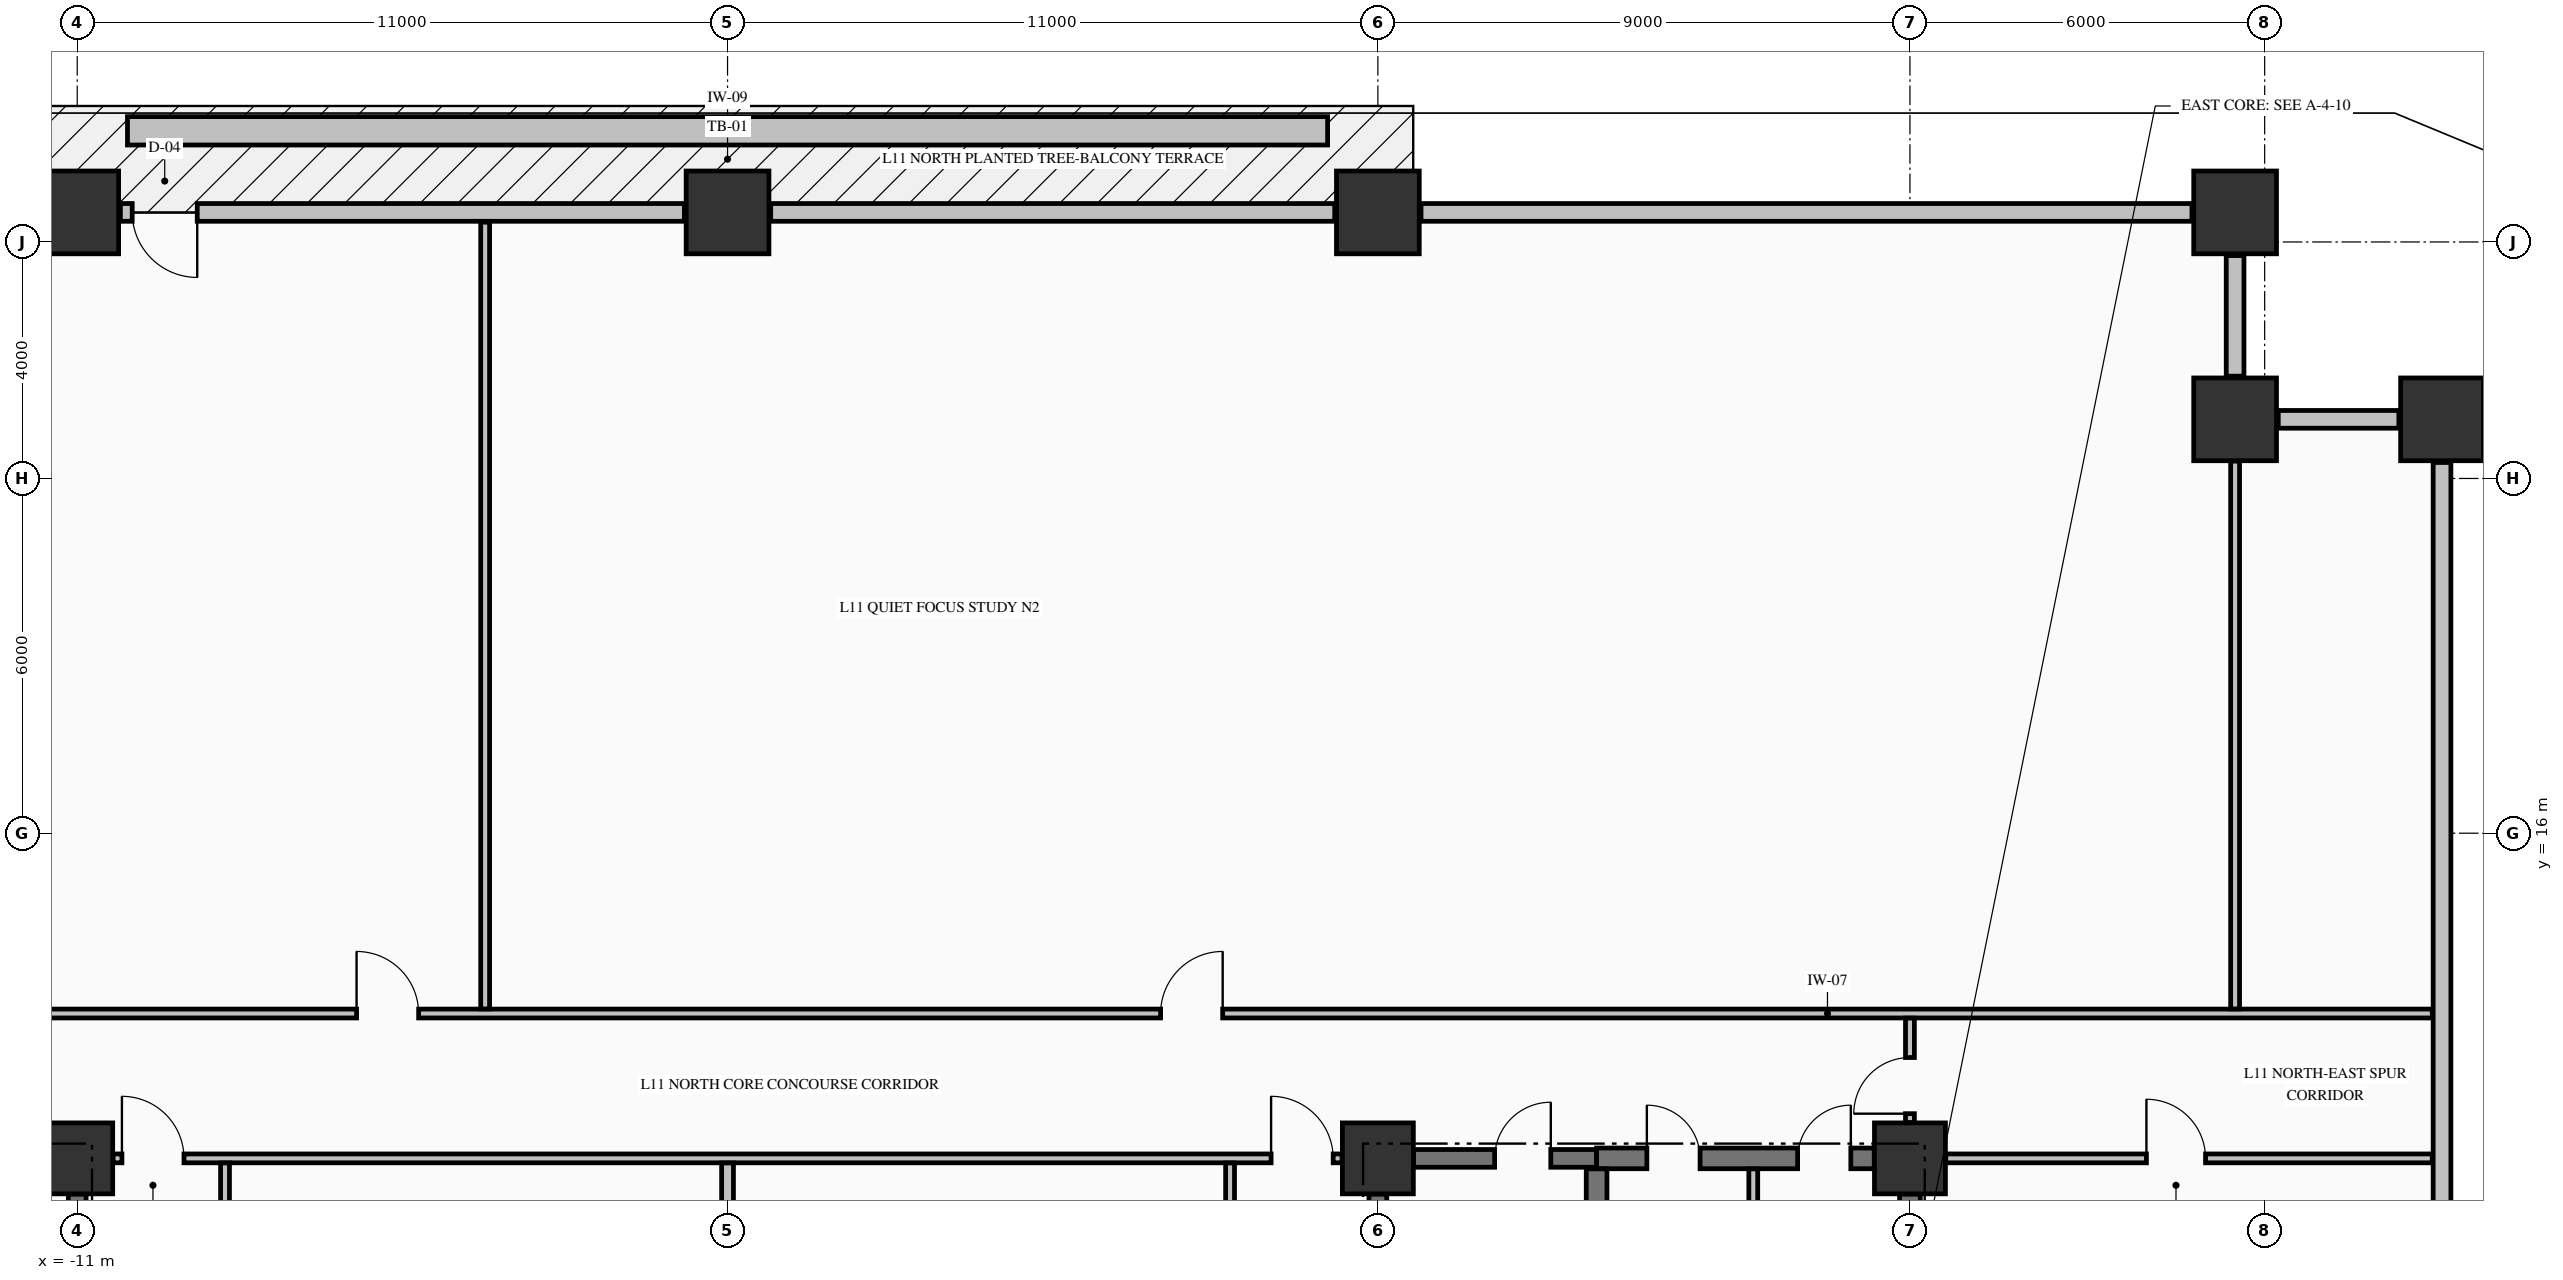
"""IFC4 building model, lengths in metres.
Left out: names, types, materials, properties, quantities, classifications, styles, units other than length and angle.
Written with IfcOpenShell. Run it as: python <this file> out.ifc"""

import sys

from ifc_helpers import new_model, si_unit, direction, frame, frame_2d, origin, origin_2d, place, context, subcontext, project, spatial, rectangle, extrude, element, fill, save


model = new_model("IFC4")
c1 = context("Model", 3, precision=1e-05, world=origin(), true_north=direction((0.0, 1.0)))
c2 = subcontext(c1, "Body", "Model", "MODEL_VIEW")
j1 = project(units=[si_unit("LENGTHUNIT", "METRE"), si_unit("PLANEANGLEUNIT", "RADIAN")], contexts=[c1])
p1 = place(None, origin())
s1 = spatial("IfcSite", under=j1, at=p1, CompositionType="ELEMENT")
p2 = place(p1, origin())
s2 = spatial("IfcBuilding", under=s1, at=p2, CompositionType="ELEMENT")
p3 = place(p2, frame((0.0, 0.0, 48.62)))
s3 = spatial("IfcBuildingStorey", under=s2, at=p3, CompositionType="ELEMENT", Elevation=48.62)
for number, where, z_axis, x_axis in (
    (1, (-11.0, 26.5, -0.25), (0.0, 0.0, 1.0), (1.0, 0.0, 0.0)),
    (2, (0.0, 26.5, -0.25), (0.0, 0.0, 1.0), (1.0, 0.0, 0.0)),
    (3, (11.0, 26.5, -0.25), (0.0, 0.0, 1.0), (1.0, 0.0, 0.0)),
    (4, (25.5, 26.5, -0.25), (0.0, 0.0, 1.0), (1.0, 0.0, 0.0)),
    (5, (29.0, 23.0, -0.25), (0.0, 0.0, 1.0), (1.0, 0.0, 0.0)),
    (6, (25.5, 23.0, -0.25), (0.0, 0.0, 1.0), (1.0, 0.0, 0.0)),
):
    element("IfcColumn", number, at=place(p3, frame(where, z_axis=z_axis, x_axis=x_axis)), inside=s3, PredefinedType="COLUMN", context=c2, shape_type="SweptSolid", body=[
        extrude(rectangle(XDim=1.4, YDim=1.4, at=origin_2d()), origin(), (0.0, 0.0, 1.0), 3.395),
    ])
for number, where, z_axis, x_axis in (
    (7, (-11.0, 10.5, -0.25), (0.0, 0.0, 1.0), (1.0, 0.0, 0.0)),
    (8, (11.0, 10.5, -0.25), (0.0, 0.0, 1.0), (1.0, 0.0, 0.0)),
    (9, (20.0, 10.5, -0.25), (0.0, 0.0, 1.0), (1.0, 0.0, 0.0)),
):
    element("IfcColumn", number, at=place(p3, frame(where, z_axis=z_axis, x_axis=x_axis)), inside=s3, PredefinedType="COLUMN", context=c2, shape_type="SweptSolid", body=[
        extrude(rectangle(XDim=1.2, YDim=1.2, at=origin_2d()), origin(), (0.0, 0.0, 1.0), 3.395),
    ])
for number, where, z_axis, x_axis in (
    (10, (28.27, 23.0, 0.0), (0.0, 0.0, 1.0), (-1.0, 0.0, 0.0)),
    (11, (25.5, 23.73, 0.0), (0.0, 0.0, 1.0), (0.0, 1.0, 0.0)),
):
    element("IfcWall", number, at=place(p3, frame(where, z_axis=z_axis, x_axis=x_axis)), inside=s3, PredefinedType="STANDARD", context=c2, shape_type="SweptSolid", body=[
        extrude(rectangle(XDim=2.04, YDim=0.3, at=frame_2d((1.02, 0.0))), origin(), (0.0, 0.0, 1.0), 2.537),
    ])
p4 = place(p3, frame((-0.73, 26.5, 0.0), z_axis=(0.0, 0.0, 1.0), x_axis=(-1.0, 0.0, 0.0)))
e12 = element("IfcWall", 12, at=p4, inside=s3, PredefinedType="STANDARD", context=c2, shape_type="SweptSolid", body=[
    extrude(rectangle(XDim=9.54, YDim=0.3, at=frame_2d((4.77, 0.0))), origin(), (0.0, 0.0, 1.0), 2.537),
])
p5 = place(p4, frame((8.24, 0.0, 0.0)))
e13 = element("IfcOpeningElement", 13, at=p5, cuts=e12, PredefinedType="OPENING", context=c2, shape_type="SweptSolid", body=[
    extrude(rectangle(XDim=1.1, YDim=2.15, at=frame_2d((0.55, 1.075))), frame((0.0, 0.16, 0.0), z_axis=(0.0, -1.0, 0.0), x_axis=(1.0, 0.0, 0.0)), (0.0, 0.0, 1.0), 0.32),
])
p6 = place(p3, frame((10.27, 26.5, 0.0), z_axis=(0.0, 0.0, 1.0), x_axis=(-1.0, 0.0, 0.0)))
e14 = element("IfcWall", 14, at=p6, inside=s3, PredefinedType="STANDARD", context=c2, shape_type="SweptSolid", body=[
    extrude(rectangle(XDim=9.54, YDim=0.3, at=frame_2d((4.77, 0.0))), origin(), (0.0, 0.0, 1.0), 2.537),
])
p7 = place(p3, frame((24.77, 26.5, 0.0), z_axis=(0.0, 0.0, 1.0), x_axis=(-1.0, 0.0, 0.0)))
e15 = element("IfcWall", 15, at=p7, inside=s3, PredefinedType="STANDARD", context=c2, shape_type="SweptSolid", body=[
    extrude(rectangle(XDim=13.04, YDim=0.3, at=frame_2d((6.52, 0.0))), origin(), (0.0, 0.0, 1.0), 2.537),
])
p8 = place(p3, frame((29.0, 9.73, 0.0), z_axis=(0.0, 0.0, 1.0), x_axis=(0.0, 1.0, 0.0)))
e16 = element("IfcWall", 16, at=p8, inside=s3, PredefinedType="STANDARD", context=c2, shape_type="SweptSolid", body=[
    extrude(rectangle(XDim=12.54, YDim=0.3, at=frame_2d((6.27, 0.0))), origin(), (0.0, 0.0, 1.0), 2.537),
])
p9 = place(p3, frame((11.604, 10.5, 0.0), z_axis=(0.0, 0.0, 1.0), x_axis=(1.0, 0.0, 0.0)))
e17 = element("IfcWall", 17, at=p9, inside=s3, PredefinedType="SHEAR", context=c2, shape_type="SweptSolid", body=[
    extrude(rectangle(XDim=3.096, YDim=0.3, at=frame_2d((1.548, 0.0))), origin(), (0.0, 0.0, 1.0), 3.145),
])
p10 = place(p9, frame((1.371, 0.0, 0.0)))
e18 = element("IfcOpeningElement", 18, at=p10, cuts=e17, PredefinedType="OPENING", context=c2, shape_type="SweptSolid", body=[
    extrude(rectangle(XDim=0.95, YDim=2.15, at=frame_2d((0.475, 1.075))), frame((0.0, 0.16, 0.0), z_axis=(0.0, -1.0, 0.0), x_axis=(1.0, 0.0, 0.0)), (0.0, 0.0, 1.0), 0.32),
])
p11 = place(p3, frame((14.7, 10.5, 0.0), z_axis=(0.0, 0.0, 1.0), x_axis=(1.0, 0.0, 0.0)))
e19 = element("IfcWall", 19, at=p11, inside=s3, PredefinedType="SHEAR", context=c2, shape_type="SweptSolid", body=[
    extrude(rectangle(XDim=4.696, YDim=0.35, at=frame_2d((2.348, 0.0))), origin(), (0.0, 0.0, 1.0), 3.145),
])
p12 = place(p11, frame((0.85, 0.0, 0.0)))
e20 = element("IfcOpeningElement", 20, at=p12, cuts=e19, PredefinedType="OPENING", context=c2, shape_type="SweptSolid", body=[
    extrude(rectangle(XDim=0.9, YDim=2.15, at=frame_2d((0.45, 1.075))), frame((0.0, 0.185, 0.0), z_axis=(0.0, -1.0, 0.0), x_axis=(1.0, 0.0, 0.0)), (0.0, 0.0, 1.0), 0.37),
])
p13 = place(p11, frame((3.4, 0.0, 0.0)))
e21 = element("IfcOpeningElement", 21, at=p13, cuts=e19, PredefinedType="OPENING", context=c2, shape_type="SweptSolid", body=[
    extrude(rectangle(XDim=0.9, YDim=2.15, at=frame_2d((0.45, 1.075))), frame((0.0, 0.185, 0.0), z_axis=(0.0, -1.0, 0.0), x_axis=(1.0, 0.0, 0.0)), (0.0, 0.0, 1.0), 0.37),
])
p14 = place(p3, frame((-10.394, 10.5, 0.0), z_axis=(0.0, 0.0, 1.0), x_axis=(1.0, 0.0, 0.0)))
e22 = element("IfcWall", 22, at=p14, inside=s3, PredefinedType="PARTITIONING", context=c2, shape_type="SweptSolid", body=[
    extrude(rectangle(XDim=20.788, YDim=0.15, at=frame_2d((10.394, 0.0))), origin(), (0.0, 0.0, 1.0), 3.145),
])
p15 = place(p14, frame((0.15, 0.0, 0.0)))
e23 = element("IfcOpeningElement", 23, at=p15, cuts=e22, PredefinedType="OPENING", context=c2, shape_type="SweptSolid", body=[
    extrude(rectangle(XDim=1.05, YDim=2.15, at=frame_2d((0.525, 1.075))), frame((0.0, 0.085, 0.0), z_axis=(0.0, -1.0, 0.0), x_axis=(1.0, 0.0, 0.0)), (0.0, 0.0, 1.0), 0.17),
])
p16 = place(p14, frame((19.588, 0.0, 0.0)))
e24 = element("IfcOpeningElement", 24, at=p16, cuts=e22, PredefinedType="OPENING", context=c2, shape_type="SweptSolid", body=[
    extrude(rectangle(XDim=1.05, YDim=2.15, at=frame_2d((0.525, 1.075))), frame((0.0, 0.085, 0.0), z_axis=(0.0, -1.0, 0.0), x_axis=(1.0, 0.0, 0.0)), (0.0, 0.0, 1.0), 0.17),
])
p17 = place(p3, frame((20.606, 10.5, 0.0), z_axis=(0.0, 0.0, 1.0), x_axis=(1.0, 0.0, 0.0)))
e25 = element("IfcWall", 25, at=p17, inside=s3, PredefinedType="PARTITIONING", context=c2, shape_type="SweptSolid", body=[
    extrude(rectangle(XDim=8.229, YDim=0.15, at=frame_2d((4.115, 0.0))), origin(), (0.0, 0.0, 1.0), 3.145),
])
p18 = place(p17, frame((3.394, 0.0, 0.0)))
e26 = element("IfcOpeningElement", 26, at=p18, cuts=e25, PredefinedType="OPENING", context=c2, shape_type="SweptSolid", body=[
    extrude(rectangle(XDim=1.0, YDim=2.15, at=frame_2d((0.5, 1.075))), frame((0.0, 0.085, 0.0), z_axis=(0.0, -1.0, 0.0), x_axis=(1.0, 0.0, 0.0)), (0.0, 0.0, 1.0), 0.17),
])
p19 = place(p3, frame((-23.835, 12.95, 0.0), z_axis=(0.0, 0.0, 1.0), x_axis=(1.0, 0.0, 0.0)))
e27 = element("IfcWall", 27, at=p19, inside=s3, PredefinedType="PARTITIONING", context=c2, shape_type="SweptSolid", body=[
    extrude(rectangle(XDim=52.67, YDim=0.15, at=frame_2d((26.335, 0.0))), origin(), (0.0, 0.0, 1.0), 3.145),
])
p20 = place(p19, frame((17.56, 0.0, 0.0)))
e28 = element("IfcOpeningElement", 28, at=p20, cuts=e27, PredefinedType="OPENING", context=c2, shape_type="SweptSolid", body=[
    extrude(rectangle(XDim=1.05, YDim=2.15, at=frame_2d((0.525, 1.075))), frame((0.0, 0.085, 0.0), z_axis=(0.0, -1.0, 0.0), x_axis=(1.0, 0.0, 0.0)), (0.0, 0.0, 1.0), 0.17),
])
p21 = place(p19, frame((31.16, 0.0, 0.0)))
e29 = element("IfcOpeningElement", 29, at=p21, cuts=e27, PredefinedType="OPENING", context=c2, shape_type="SweptSolid", body=[
    extrude(rectangle(XDim=1.05, YDim=2.15, at=frame_2d((0.525, 1.075))), frame((0.0, 0.085, 0.0), z_axis=(0.0, -1.0, 0.0), x_axis=(1.0, 0.0, 0.0)), (0.0, 0.0, 1.0), 0.17),
])
for number, where, z_axis, x_axis in (
    (30, (-11.0, 5.852, 0.0), (0.0, 0.0, 1.0), (0.0, 1.0, 0.0)),
    (31, (11.0, 5.852, 0.0), (0.0, 0.0, 1.0), (0.0, 1.0, 0.0)),
):
    element("IfcWall", number, at=place(p3, frame(where, z_axis=z_axis, x_axis=x_axis)), inside=s3, PredefinedType="SHEAR", context=c2, shape_type="SweptSolid", body=[
        extrude(rectangle(XDim=4.044, YDim=0.3, at=frame_2d((2.022, 0.0))), origin(), (0.0, 0.0, 1.0), 3.145),
    ])
p22 = place(p3, frame((14.7, 5.852, 0.0), z_axis=(0.0, 0.0, 1.0), x_axis=(0.0, 1.0, 0.0)))
e32 = element("IfcWall", 32, at=p22, inside=s3, PredefinedType="SHEAR", context=c2, shape_type="SweptSolid", body=[
    extrude(rectangle(XDim=4.471, YDim=0.35, at=frame_2d((2.235, 0.0))), origin(), (0.0, 0.0, 1.0), 3.145),
])
p23 = place(p3, frame((20.0, 0.604, 0.0), z_axis=(0.0, 0.0, 1.0), x_axis=(0.0, 1.0, 0.0)))
e33 = element("IfcWall", 33, at=p23, inside=s3, PredefinedType="SHEAR", context=c2, shape_type="SweptSolid", body=[
    extrude(rectangle(XDim=9.292, YDim=0.35, at=frame_2d((4.646, 0.0))), origin(), (0.0, 0.0, 1.0), 3.145),
])
p24 = place(p3, frame((-8.5, 3.703, 0.0), z_axis=(0.0, 0.0, 1.0), x_axis=(0.0, 1.0, 0.0)))
e34 = element("IfcWall", 34, at=p24, inside=s3, PredefinedType="PARTITIONING", context=c2, shape_type="SweptSolid", body=[
    extrude(rectangle(XDim=6.719, YDim=0.15, at=frame_2d((3.36, 0.0))), origin(), (0.0, 0.0, 1.0), 3.145),
])
p25 = place(p24, frame((2.822, 0.0, 0.0)))
e35 = element("IfcOpeningElement", 35, at=p25, cuts=e34, PredefinedType="OPENING", context=c2, shape_type="SweptSolid", body=[
    extrude(rectangle(XDim=1.05, YDim=2.15, at=frame_2d((0.525, 1.075))), frame((0.0, 0.085, 0.0), z_axis=(0.0, -1.0, 0.0), x_axis=(1.0, 0.0, 0.0)), (0.0, 0.0, 1.0), 0.17),
])
p26 = place(p3, frame((-4.1, 13.028, 0.0), z_axis=(0.0, 0.0, 1.0), x_axis=(0.0, 1.0, 0.0)))
e36 = element("IfcWall", 36, at=p26, inside=s3, PredefinedType="PARTITIONING", context=c2, shape_type="SweptSolid", body=[
    extrude(rectangle(XDim=13.307, YDim=0.15, at=frame_2d((6.653, 0.0))), origin(), (0.0, 0.0, 1.0), 3.145),
])
p27 = place(p3, frame((0.0, 9.606, 0.0), z_axis=(0.0, 0.0, 1.0), x_axis=(0.0, 1.0, 0.0)))
e37 = element("IfcWall", 37, at=p27, inside=s3, PredefinedType="PARTITIONING", context=c2, shape_type="SweptSolid", body=[
    extrude(rectangle(XDim=0.816, YDim=0.2, at=frame_2d((0.408, 0.0))), origin(), (0.0, 0.0, 1.0), 2.485),
])
p28 = place(p3, frame((8.5, -1.097, 0.0), z_axis=(0.0, 0.0, 1.0), x_axis=(0.0, 1.0, 0.0)))
e38 = element("IfcWall", 38, at=p28, inside=s3, PredefinedType="PARTITIONING", context=c2, shape_type="SweptSolid", body=[
    extrude(rectangle(XDim=11.519, YDim=0.15, at=frame_2d((5.76, 0.0))), origin(), (0.0, 0.0, 1.0), 3.145),
])
p29 = place(p28, frame((5.197, 0.0, 0.0)))
e39 = element("IfcOpeningElement", 39, at=p29, cuts=e38, PredefinedType="OPENING", context=c2, shape_type="SweptSolid", body=[
    extrude(rectangle(XDim=1.1, YDim=2.15, at=frame_2d((0.55, 1.075))), frame((0.0, 0.085, 0.0), z_axis=(0.0, -1.0, 0.0), x_axis=(1.0, 0.0, 0.0)), (0.0, 0.0, 1.0), 0.17),
])
p30 = place(p3, frame((17.35, -4.422, 0.0), z_axis=(0.0, 0.0, 1.0), x_axis=(0.0, 1.0, 0.0)))
e40 = element("IfcWall", 40, at=p30, inside=s3, PredefinedType="PARTITIONING", context=c2, shape_type="SweptSolid", body=[
    extrude(rectangle(XDim=14.744, YDim=0.15, at=frame_2d((7.372, 0.0))), origin(), (0.0, 0.0, 1.0), 3.145),
])
p31 = place(p3, frame((20.0, 11.106, 0.0), z_axis=(0.0, 0.0, 1.0), x_axis=(0.0, 1.0, 0.0)))
e41 = element("IfcWall", 41, at=p31, inside=s3, PredefinedType="PARTITIONING", context=c2, shape_type="SweptSolid", body=[
    extrude(rectangle(XDim=1.766, YDim=0.15, at=frame_2d((0.883, 0.0))), origin(), (0.0, 0.0, 1.0), 2.485),
])
p32 = place(p31, frame((0.15, 0.0, 0.0)))
e42 = element("IfcOpeningElement", 42, at=p32, cuts=e41, PredefinedType="OPENING", context=c2, shape_type="SweptSolid", body=[
    extrude(rectangle(XDim=0.95, YDim=2.15, at=frame_2d((0.475, 1.075))), frame((0.0, 0.085, 0.0), z_axis=(0.0, -1.0, 0.0), x_axis=(1.0, 0.0, 0.0)), (0.0, 0.0, 1.0), 0.17),
])
p33 = place(p3, frame((25.5, 13.028, 0.0), z_axis=(0.0, 0.0, 1.0), x_axis=(0.0, 1.0, 0.0)))
e43 = element("IfcWall", 43, at=p33, inside=s3, PredefinedType="PARTITIONING", context=c2, shape_type="SweptSolid", body=[
    extrude(rectangle(XDim=9.266, YDim=0.15, at=frame_2d((4.633, 0.0))), origin(), (0.0, 0.0, 1.0), 3.145),
])
p34 = place(p3, frame((-10.15, 27.88, -0.04), z_axis=(0.0, 0.0, 1.0), x_axis=(1.0, 0.0, 0.0)))
e44 = element("IfcWall", 44, at=p34, inside=s3, PredefinedType="PARAPET", context=c2, shape_type="SweptSolid", body=[
    extrude(rectangle(XDim=20.3, YDim=0.48, at=frame_2d((10.15, 0.0))), origin(), (0.0, 0.0, 1.0), 0.52),
])
p35 = place(p5, origin())
e45 = element("IfcDoor", 45, at=p35, inside=s3, OperationType="SINGLE_SWING_LEFT", PredefinedType="DOOR", context=c2, shape_type="SweptSolid", body=[
    extrude(rectangle(XDim=1.1, YDim=2.15, at=frame_2d((0.55, 1.075))), frame((0.0, 0.025, 0.0), z_axis=(0.0, -1.0, 0.0), x_axis=(1.0, 0.0, 0.0)), (0.0, 0.0, 1.0), 0.05),
])
fill(e13, e45)
p36 = place(p10, origin())
e46 = element("IfcDoor", 46, at=p36, inside=s3, OperationType="SINGLE_SWING_RIGHT", PredefinedType="DOOR", context=c2, shape_type="SweptSolid", body=[
    extrude(rectangle(XDim=0.95, YDim=2.15, at=frame_2d((0.475, 1.075))), frame((0.0, 0.025, 0.0), z_axis=(0.0, -1.0, 0.0), x_axis=(1.0, 0.0, 0.0)), (0.0, 0.0, 1.0), 0.05),
])
fill(e18, e46)
p37 = place(p12, origin())
e47 = element("IfcDoor", 47, at=p37, inside=s3, OperationType="SINGLE_SWING_LEFT", PredefinedType="DOOR", context=c2, shape_type="SweptSolid", body=[
    extrude(rectangle(XDim=0.9, YDim=2.15, at=frame_2d((0.45, 1.075))), frame((0.0, 0.025, 0.0), z_axis=(0.0, -1.0, 0.0), x_axis=(1.0, 0.0, 0.0)), (0.0, 0.0, 1.0), 0.05),
])
fill(e20, e47)
p38 = place(p13, origin())
e48 = element("IfcDoor", 48, at=p38, inside=s3, OperationType="SINGLE_SWING_RIGHT", PredefinedType="DOOR", context=c2, shape_type="SweptSolid", body=[
    extrude(rectangle(XDim=0.9, YDim=2.15, at=frame_2d((0.45, 1.075))), frame((0.0, 0.025, 0.0), z_axis=(0.0, -1.0, 0.0), x_axis=(1.0, 0.0, 0.0)), (0.0, 0.0, 1.0), 0.05),
])
fill(e21, e48)
p39 = place(p15, origin())
e49 = element("IfcDoor", 49, at=p39, inside=s3, OperationType="SINGLE_SWING_LEFT", PredefinedType="DOOR", context=c2, shape_type="SweptSolid", body=[
    extrude(rectangle(XDim=1.05, YDim=2.15, at=frame_2d((0.525, 1.075))), frame((0.0, 0.025, 0.0), z_axis=(0.0, -1.0, 0.0), x_axis=(1.0, 0.0, 0.0)), (0.0, 0.0, 1.0), 0.05),
])
fill(e23, e49)
p40 = place(p16, origin())
e50 = element("IfcDoor", 50, at=p40, inside=s3, OperationType="SINGLE_SWING_LEFT", PredefinedType="DOOR", context=c2, shape_type="SweptSolid", body=[
    extrude(rectangle(XDim=1.05, YDim=2.15, at=frame_2d((0.525, 1.075))), frame((0.0, 0.025, 0.0), z_axis=(0.0, -1.0, 0.0), x_axis=(1.0, 0.0, 0.0)), (0.0, 0.0, 1.0), 0.05),
])
fill(e24, e50)
p41 = place(p20, origin())
e51 = element("IfcDoor", 51, at=p41, inside=s3, OperationType="SINGLE_SWING_LEFT", PredefinedType="DOOR", context=c2, shape_type="SweptSolid", body=[
    extrude(rectangle(XDim=1.05, YDim=2.15, at=frame_2d((0.525, 1.075))), frame((0.0, 0.025, 0.0), z_axis=(0.0, -1.0, 0.0), x_axis=(1.0, 0.0, 0.0)), (0.0, 0.0, 1.0), 0.05),
])
fill(e28, e51)
p42 = place(p21, origin())
e52 = element("IfcDoor", 52, at=p42, inside=s3, OperationType="SINGLE_SWING_RIGHT", PredefinedType="DOOR", context=c2, shape_type="SweptSolid", body=[
    extrude(rectangle(XDim=1.05, YDim=2.15, at=frame_2d((0.525, 1.075))), frame((0.0, 0.025, 0.0), z_axis=(0.0, -1.0, 0.0), x_axis=(1.0, 0.0, 0.0)), (0.0, 0.0, 1.0), 0.05),
])
fill(e29, e52)
p43 = place(p32, origin())
e53 = element("IfcDoor", 53, at=p43, inside=s3, OperationType="SINGLE_SWING_LEFT", PredefinedType="DOOR", context=c2, shape_type="SweptSolid", body=[
    extrude(rectangle(XDim=0.95, YDim=2.15, at=frame_2d((0.475, 1.075))), frame((0.0, 0.025, 0.0), z_axis=(0.0, -1.0, 0.0), x_axis=(1.0, 0.0, 0.0)), (0.0, 0.0, 1.0), 0.05),
])
fill(e42, e53)
p44 = place(p18, origin())
e54 = element("IfcDoor", 54, at=p44, inside=s3, OperationType="SINGLE_SWING_LEFT", PredefinedType="DOOR", context=c2, shape_type="SweptSolid", body=[
    extrude(rectangle(XDim=1.0, YDim=2.15, at=frame_2d((0.5, 1.075))), frame((0.0, 0.025, 0.0), z_axis=(0.0, -1.0, 0.0), x_axis=(1.0, 0.0, 0.0)), (0.0, 0.0, 1.0), 0.05),
])
fill(e26, e54)
save(model, sys.argv[1])
